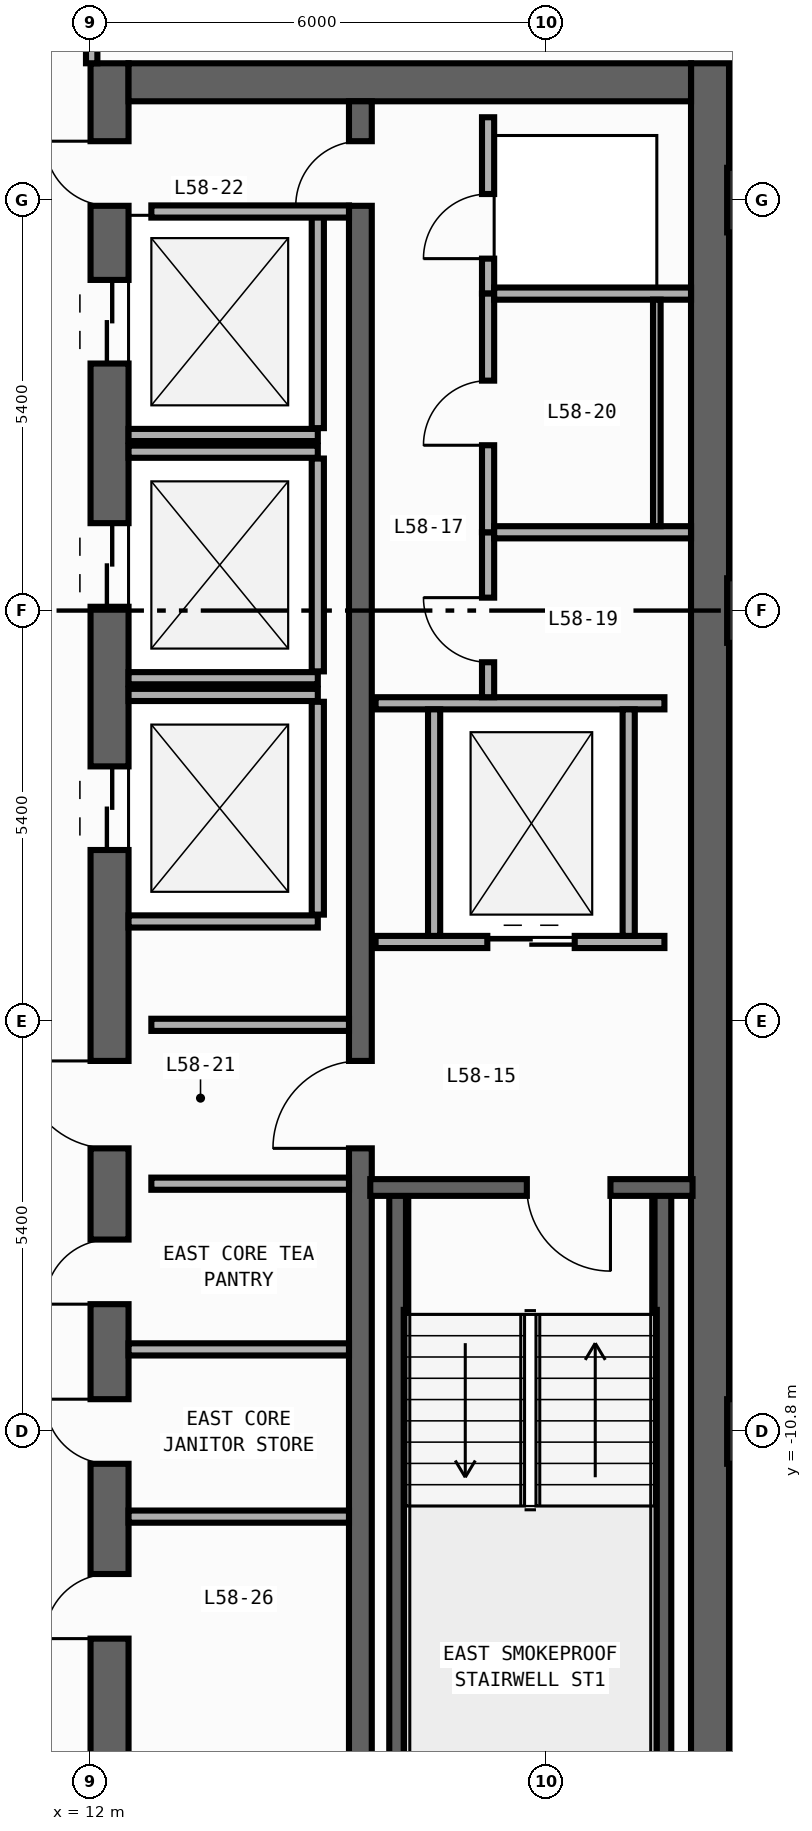
"""IFC4 building model, lengths in metres.
Left out: names, types, materials, properties, quantities, classifications, styles, units other than length and angle.
Written with IfcOpenShell. Run it as: python <this file> out.ifc"""

import sys

from ifc_helpers import new_model, si_unit, direction, frame, frame_2d, origin, origin_2d, place, context, subcontext, project, spatial, rectangle, extrude, element, fill, save


model = new_model("IFC4")
c1 = context("Model", 3, precision=1e-05, world=origin(), true_north=direction((0.0, 1.0)))
c2 = subcontext(c1, "Body", "Model", "MODEL_VIEW")
j1 = project(units=[si_unit("LENGTHUNIT", "METRE"), si_unit("PLANEANGLEUNIT", "RADIAN")], contexts=[c1])
p1 = place(None, origin())
s1 = spatial("IfcSite", under=j1, at=p1, CompositionType="ELEMENT")
p2 = place(p1, origin())
s2 = spatial("IfcBuilding", under=s1, at=p2, CompositionType="ELEMENT")
p3 = place(p2, frame((0.0, 0.0, 247.6)))
s3 = spatial("IfcBuildingStorey", under=s2, at=p3, CompositionType="ELEMENT", Elevation=247.6)
p4 = place(p3, frame((12.25, -19.8, 0.0), z_axis=(0.0, 0.0, 1.0), x_axis=(0.0, 1.0, 0.0)))
e1 = element("IfcWall", 1, at=p4, inside=s3, PredefinedType="SHEAR", context=c2, shape_type="SweptSolid", body=[
    extrude(rectangle(XDim=27.0, YDim=0.5, at=frame_2d((13.5, 0.0))), origin(), (0.0, 0.0, 1.0), 3.34),
])
p5 = place(p4, frame((23.05, 0.0, 0.0)))
e2 = element("IfcOpeningElement", 2, at=p5, cuts=e1, PredefinedType="OPENING", context=c2, shape_type="SweptSolid", body=[
    extrude(rectangle(XDim=1.1, YDim=2.2, at=frame_2d((0.55, 1.1))), frame((0.0, 0.26, 0.0), z_axis=(0.0, -1.0, 0.0), x_axis=(1.0, 0.0, 0.0)), (0.0, 0.0, 1.0), 0.52),
])
p6 = place(p4, frame((19.85, 0.0, 0.0)))
e3 = element("IfcOpeningElement", 3, at=p6, cuts=e1, PredefinedType="OPENING", context=c2, shape_type="SweptSolid", body=[
    extrude(rectangle(XDim=1.1, YDim=2.2, at=frame_2d((0.55, 1.1))), frame((0.0, 0.26, 0.0), z_axis=(0.0, -1.0, 0.0), x_axis=(1.0, 0.0, 0.0)), (0.0, 0.0, 1.0), 0.52),
])
p7 = place(p4, frame((16.65, 0.0, 0.0)))
e4 = element("IfcOpeningElement", 4, at=p7, cuts=e1, PredefinedType="OPENING", context=c2, shape_type="SweptSolid", body=[
    extrude(rectangle(XDim=1.1, YDim=2.2, at=frame_2d((0.55, 1.1))), frame((0.0, 0.26, 0.0), z_axis=(0.0, -1.0, 0.0), x_axis=(1.0, 0.0, 0.0)), (0.0, 0.0, 1.0), 0.52),
])
p8 = place(p4, frame((6.275, 0.0, 0.0)))
e5 = element("IfcOpeningElement", 5, at=p8, cuts=e1, PredefinedType="OPENING", context=c2, shape_type="SweptSolid", body=[
    extrude(rectangle(XDim=0.85, YDim=2.1, at=frame_2d((0.425, 1.05))), frame((0.0, 0.26, 0.0), z_axis=(0.0, -1.0, 0.0), x_axis=(1.0, 0.0, 0.0)), (0.0, 0.0, 1.0), 0.52),
])
p9 = place(p4, frame((8.575, 0.0, 0.0)))
e6 = element("IfcOpeningElement", 6, at=p9, cuts=e1, PredefinedType="OPENING", context=c2, shape_type="SweptSolid", body=[
    extrude(rectangle(XDim=0.85, YDim=2.1, at=frame_2d((0.425, 1.05))), frame((0.0, 0.26, 0.0), z_axis=(0.0, -1.0, 0.0), x_axis=(1.0, 0.0, 0.0)), (0.0, 0.0, 1.0), 0.52),
])
p10 = place(p4, frame((10.675, 0.0, 0.0)))
e7 = element("IfcOpeningElement", 7, at=p10, cuts=e1, PredefinedType="OPENING", context=c2, shape_type="SweptSolid", body=[
    extrude(rectangle(XDim=0.85, YDim=2.1, at=frame_2d((0.425, 1.05))), frame((0.0, 0.26, 0.0), z_axis=(0.0, -1.0, 0.0), x_axis=(1.0, 0.0, 0.0)), (0.0, 0.0, 1.0), 0.52),
])
p11 = place(p4, frame((12.725, 0.0, 0.0)))
e8 = element("IfcOpeningElement", 8, at=p11, cuts=e1, PredefinedType="OPENING", context=c2, shape_type="SweptSolid", body=[
    extrude(rectangle(XDim=1.15, YDim=2.2, at=frame_2d((0.575, 1.1))), frame((0.0, 0.26, 0.0), z_axis=(0.0, -1.0, 0.0), x_axis=(1.0, 0.0, 0.0)), (0.0, 0.0, 1.0), 0.52),
])
p12 = place(p4, frame((25.125, 0.0, 0.0)))
e9 = element("IfcOpeningElement", 9, at=p12, cuts=e1, PredefinedType="OPENING", context=c2, shape_type="SweptSolid", body=[
    extrude(rectangle(XDim=0.85, YDim=2.1, at=frame_2d((0.425, 1.05))), frame((0.0, 0.26, 0.0), z_axis=(0.0, -1.0, 0.0), x_axis=(1.0, 0.0, 0.0)), (0.0, 0.0, 1.0), 0.52),
])
p13 = place(p3, frame((20.15, -19.8, 0.0), z_axis=(0.0, 0.0, 1.0), x_axis=(0.0, 1.0, 0.0)))
e10 = element("IfcWall", 10, at=p13, inside=s3, PredefinedType="SHEAR", context=c2, shape_type="SweptSolid", body=[
    extrude(rectangle(XDim=27.0, YDim=0.5, at=frame_2d((13.5, 0.0))), origin(), (0.0, 0.0, 1.0), 3.34),
])
p14 = place(p3, frame((12.5, 6.95, 0.0), z_axis=(0.0, 0.0, 1.0), x_axis=(1.0, 0.0, 0.0)))
e11 = element("IfcWall", 11, at=p14, inside=s3, PredefinedType="SHEAR", context=c2, shape_type="SweptSolid", body=[
    extrude(rectangle(XDim=7.4, YDim=0.5, at=frame_2d((3.7, 0.0))), origin(), (0.0, 0.0, 1.0), 3.34),
])
p15 = place(p3, frame((15.55, -19.3, 0.0), z_axis=(0.0, 0.0, 1.0), x_axis=(0.0, 1.0, 0.0)))
e12 = element("IfcWall", 12, at=p15, inside=s3, PredefinedType="SHEAR", context=c2, shape_type="SweptSolid", body=[
    extrude(rectangle(XDim=26.0, YDim=0.3, at=frame_2d((13.0, 0.0))), origin(), (0.0, 0.0, 1.0), 3.34),
])
p16 = place(p15, frame((12.225, 0.0, 0.0)))
e13 = element("IfcOpeningElement", 13, at=p16, cuts=e12, PredefinedType="OPENING", context=c2, shape_type="SweptSolid", body=[
    extrude(rectangle(XDim=1.15, YDim=2.2, at=frame_2d((0.575, 1.1))), frame((0.0, 0.16, 0.0), z_axis=(0.0, -1.0, 0.0), x_axis=(1.0, 0.0, 0.0)), (0.0, 0.0, 1.0), 0.32),
])
p17 = place(p15, frame((24.625, 0.0, 0.0)))
e14 = element("IfcOpeningElement", 14, at=p17, cuts=e12, PredefinedType="OPENING", context=c2, shape_type="SweptSolid", body=[
    extrude(rectangle(XDim=0.85, YDim=2.1, at=frame_2d((0.425, 1.05))), frame((0.0, 0.16, 0.0), z_axis=(0.0, -1.0, 0.0), x_axis=(1.0, 0.0, 0.0)), (0.0, 0.0, 1.0), 0.32),
])
for number, where, z_axis, x_axis in (
    (15, (16.04, -19.01, 0.0), (0.0, 0.0, 1.0), (0.0, 1.0, 0.0)),
    (16, (19.53, -19.01, 0.0), (0.0, 0.0, 1.0), (0.0, 1.0, 0.0)),
):
    element("IfcWall", number, at=place(p3, frame(where, z_axis=z_axis, x_axis=x_axis)), inside=s3, PredefinedType="SHEAR", context=c2, shape_type="SweptSolid", body=[
        extrude(rectangle(XDim=11.42, YDim=0.22, at=frame_2d((5.71, 0.0))), origin(), (0.0, 0.0, 1.0), 3.34),
    ])
p18 = place(p3, frame((19.92, -7.59, 0.0), z_axis=(0.0, 0.0, 1.0), x_axis=(-1.0, 0.0, 0.0)))
e17 = element("IfcWall", 17, at=p18, inside=s3, PredefinedType="SHEAR", context=c2, shape_type="SweptSolid", body=[
    extrude(rectangle(XDim=4.24, YDim=0.22, at=frame_2d((2.12, 0.0))), origin(), (0.0, 0.0, 1.0), 3.34),
])
p19 = place(p18, frame((1.08, 0.0, 0.0)))
e18 = element("IfcOpeningElement", 18, at=p19, cuts=e17, PredefinedType="OPENING", context=c2, shape_type="SweptSolid", body=[
    extrude(rectangle(XDim=1.1, YDim=2.2, at=frame_2d((0.55, 1.1))), frame((0.0, 0.12, 0.0), z_axis=(0.0, -1.0, 0.0), x_axis=(1.0, 0.0, 0.0)), (0.0, 0.0, 1.0), 0.24),
])
for number, where, z_axis, x_axis in (
    (19, (20.8, -10.8, 0.0), (0.0, 0.0, 1.0), (1.0, 0.0, 0.0)),
    (20, (20.8, 0.0, 0.0), (0.0, 0.0, 1.0), (1.0, 0.0, 0.0)),
    (21, (20.8, 5.4, 0.0), (0.0, 0.0, 1.0), (1.0, 0.0, 0.0)),
):
    element("IfcColumn", number, at=place(p3, frame(where, z_axis=z_axis, x_axis=x_axis)), inside=s3, PredefinedType="COLUMN", context=c2, shape_type="SweptSolid", body=[
        extrude(rectangle(XDim=0.85, YDim=0.85, at=origin_2d()), origin(), (0.0, 0.0, 1.0), 3.6),
    ])
p20 = place(p3, frame((12.5, 2.31, 0.0), z_axis=(0.0, 0.0, 1.0), x_axis=(1.0, 0.0, 0.0)))
e22 = element("IfcWall", 22, at=p20, inside=s3, PredefinedType="STANDARD", context=c2, shape_type="SweptSolid", body=[
    extrude(rectangle(XDim=2.49, YDim=0.16, at=frame_2d((1.245, 0.0))), origin(), (0.0, 0.0, 1.0), 3.34),
])
p21 = place(p3, frame((14.99, 2.4, 0.0), z_axis=(0.0, 0.0, 1.0), x_axis=(0.0, 1.0, 0.0)))
e23 = element("IfcWall", 23, at=p21, inside=s3, PredefinedType="STANDARD", context=c2, shape_type="SweptSolid", body=[
    extrude(rectangle(XDim=2.8, YDim=0.16, at=frame_2d((1.4, 0.0))), origin(), (0.0, 0.0, 1.0), 3.34),
])
for number, where, z_axis, x_axis in (
    (24, (12.5, -0.89, 0.0), (0.0, 0.0, 1.0), (1.0, 0.0, 0.0)),
    (25, (12.5, 2.09, 0.0), (0.0, 0.0, 1.0), (1.0, 0.0, 0.0)),
):
    element("IfcWall", number, at=place(p3, frame(where, z_axis=z_axis, x_axis=x_axis)), inside=s3, PredefinedType="STANDARD", context=c2, shape_type="SweptSolid", body=[
        extrude(rectangle(XDim=2.49, YDim=0.16, at=frame_2d((1.245, 0.0))), origin(), (0.0, 0.0, 1.0), 3.34),
    ])
p22 = place(p3, frame((14.99, -0.8, 0.0), z_axis=(0.0, 0.0, 1.0), x_axis=(0.0, 1.0, 0.0)))
e26 = element("IfcWall", 26, at=p22, inside=s3, PredefinedType="STANDARD", context=c2, shape_type="SweptSolid", body=[
    extrude(rectangle(XDim=2.8, YDim=0.16, at=frame_2d((1.4, 0.0))), origin(), (0.0, 0.0, 1.0), 3.34),
])
for number, where, z_axis, x_axis in (
    (27, (12.5, -4.09, 0.0), (0.0, 0.0, 1.0), (1.0, 0.0, 0.0)),
    (28, (12.5, -1.11, 0.0), (0.0, 0.0, 1.0), (1.0, 0.0, 0.0)),
):
    element("IfcWall", number, at=place(p3, frame(where, z_axis=z_axis, x_axis=x_axis)), inside=s3, PredefinedType="STANDARD", context=c2, shape_type="SweptSolid", body=[
        extrude(rectangle(XDim=2.49, YDim=0.16, at=frame_2d((1.245, 0.0))), origin(), (0.0, 0.0, 1.0), 3.34),
    ])
p23 = place(p3, frame((14.99, -4.0, 0.0), z_axis=(0.0, 0.0, 1.0), x_axis=(0.0, 1.0, 0.0)))
e29 = element("IfcWall", 29, at=p23, inside=s3, PredefinedType="STANDARD", context=c2, shape_type="SweptSolid", body=[
    extrude(rectangle(XDim=2.8, YDim=0.16, at=frame_2d((1.4, 0.0))), origin(), (0.0, 0.0, 1.0), 3.34),
])
p24 = place(p3, frame((15.75, -4.36, 0.0), z_axis=(0.0, 0.0, 1.0), x_axis=(1.0, 0.0, 0.0)))
e30 = element("IfcWall", 30, at=p24, inside=s3, PredefinedType="STANDARD", context=c2, shape_type="SweptSolid", body=[
    extrude(rectangle(XDim=3.8, YDim=0.16, at=frame_2d((1.9, 0.0))), origin(), (0.0, 0.0, 1.0), 3.34),
])
p25 = place(p24, frame((1.47, 0.0, 0.0)))
e31 = element("IfcOpeningElement", 31, at=p25, cuts=e30, PredefinedType="OPENING", context=c2, shape_type="SweptSolid", body=[
    extrude(rectangle(XDim=1.15, YDim=2.2, at=frame_2d((0.575, 1.1))), frame((0.0, 0.09, 0.0), z_axis=(0.0, -1.0, 0.0), x_axis=(1.0, 0.0, 0.0)), (0.0, 0.0, 1.0), 0.18),
])
p26 = place(p3, frame((15.75, -1.22, 0.0), z_axis=(0.0, 0.0, 1.0), x_axis=(1.0, 0.0, 0.0)))
e32 = element("IfcWall", 32, at=p26, inside=s3, PredefinedType="STANDARD", context=c2, shape_type="SweptSolid", body=[
    extrude(rectangle(XDim=3.8, YDim=0.16, at=frame_2d((1.9, 0.0))), origin(), (0.0, 0.0, 1.0), 3.34),
])
for number, where, z_axis, x_axis in (
    (33, (16.52, -4.28, 0.0), (0.0, 0.0, 1.0), (0.0, 1.0, 0.0)),
    (34, (19.08, -4.28, 0.0), (0.0, 0.0, 1.0), (0.0, 1.0, 0.0)),
):
    element("IfcWall", number, at=place(p3, frame(where, z_axis=z_axis, x_axis=x_axis)), inside=s3, PredefinedType="STANDARD", context=c2, shape_type="SweptSolid", body=[
        extrude(rectangle(XDim=2.98, YDim=0.16, at=frame_2d((1.49, 0.0))), origin(), (0.0, 0.0, 1.0), 3.34),
    ])
for number, where, z_axis, x_axis in (
    (35, (12.8, -5.45, 0.0), (0.0, 0.0, 1.0), (1.0, 0.0, 0.0)),
    (36, (12.8, -7.54, 0.0), (0.0, 0.0, 1.0), (1.0, 0.0, 0.0)),
    (37, (12.8, 5.25, 0.0), (0.0, 0.0, 1.0), (1.0, 0.0, 0.0)),
):
    element("IfcWall", number, at=place(p3, frame(where, z_axis=z_axis, x_axis=x_axis)), inside=s3, PredefinedType="STANDARD", context=c2, shape_type="SweptSolid", body=[
        extrude(rectangle(XDim=2.6, YDim=0.16, at=frame_2d((1.3, 0.0))), origin(), (0.0, 0.0, 1.0), 3.34),
    ])
p27 = place(p3, frame((17.23, 4.17, 0.0), z_axis=(0.0, 0.0, 1.0), x_axis=(0.0, 1.0, 0.0)))
e38 = element("IfcWall", 38, at=p27, inside=s3, PredefinedType="PARTITIONING", context=c2, shape_type="SweptSolid", body=[
    extrude(rectangle(XDim=2.32, YDim=0.16, at=frame_2d((1.16, 0.0))), origin(), (0.0, 0.0, 1.0), 3.34),
])
p28 = place(p27, frame((0.46, 0.0, 0.0)))
e39 = element("IfcOpeningElement", 39, at=p28, cuts=e38, PredefinedType="OPENING", context=c2, shape_type="SweptSolid", body=[
    extrude(rectangle(XDim=0.85, YDim=2.1, at=frame_2d((0.425, 1.05))), frame((0.0, 0.09, 0.0), z_axis=(0.0, -1.0, 0.0), x_axis=(1.0, 0.0, 0.0)), (0.0, 0.0, 1.0), 0.18),
])
p29 = place(p3, frame((17.23, -1.14, 0.0), z_axis=(0.0, 0.0, 1.0), x_axis=(0.0, 1.0, 0.0)))
e40 = element("IfcWall", 40, at=p29, inside=s3, PredefinedType="PARTITIONING", context=c2, shape_type="SweptSolid", body=[
    extrude(rectangle(XDim=2.17, YDim=0.16, at=frame_2d((1.085, 0.0))), origin(), (0.0, 0.0, 1.0), 3.34),
])
p30 = place(p29, frame((0.46, 0.0, 0.0)))
e41 = element("IfcOpeningElement", 41, at=p30, cuts=e40, PredefinedType="OPENING", context=c2, shape_type="SweptSolid", body=[
    extrude(rectangle(XDim=0.85, YDim=2.1, at=frame_2d((0.425, 1.05))), frame((0.0, 0.09, 0.0), z_axis=(0.0, -1.0, 0.0), x_axis=(1.0, 0.0, 0.0)), (0.0, 0.0, 1.0), 0.18),
])
p31 = place(p3, frame((17.23, 1.03, 0.0), z_axis=(0.0, 0.0, 1.0), x_axis=(0.0, 1.0, 0.0)))
e42 = element("IfcWall", 42, at=p31, inside=s3, PredefinedType="PARTITIONING", context=c2, shape_type="SweptSolid", body=[
    extrude(rectangle(XDim=3.14, YDim=0.16, at=frame_2d((1.57, 0.0))), origin(), (0.0, 0.0, 1.0), 3.34),
])
p32 = place(p31, frame((1.145, 0.0, 0.0)))
e43 = element("IfcOpeningElement", 43, at=p32, cuts=e42, PredefinedType="OPENING", context=c2, shape_type="SweptSolid", body=[
    extrude(rectangle(XDim=0.85, YDim=2.1, at=frame_2d((0.425, 1.05))), frame((0.0, 0.09, 0.0), z_axis=(0.0, -1.0, 0.0), x_axis=(1.0, 0.0, 0.0)), (0.0, 0.0, 1.0), 0.18),
])
for number, where, z_axis, x_axis in (
    (44, (17.31, 4.17, 0.0), (0.0, 0.0, 1.0), (1.0, 0.0, 0.0)),
    (45, (17.31, 1.03, 0.0), (0.0, 0.0, 1.0), (1.0, 0.0, 0.0)),
):
    element("IfcWall", number, at=place(p3, frame(where, z_axis=z_axis, x_axis=x_axis)), inside=s3, PredefinedType="PARTITIONING", context=c2, shape_type="SweptSolid", body=[
        extrude(rectangle(XDim=2.59, YDim=0.16, at=frame_2d((1.295, 0.0))), origin(), (0.0, 0.0, 1.0), 3.34),
    ])
for number, where, z_axis, x_axis in (
    (46, (12.5, -11.92, 0.0), (0.0, 0.0, 1.0), (1.0, 0.0, 0.0)),
    (47, (12.5, -9.72, 0.0), (0.0, 0.0, 1.0), (1.0, 0.0, 0.0)),
):
    element("IfcWall", number, at=place(p3, frame(where, z_axis=z_axis, x_axis=x_axis)), inside=s3, PredefinedType="PARTITIONING", context=c2, shape_type="SweptSolid", body=[
        extrude(rectangle(XDim=2.9, YDim=0.16, at=frame_2d((1.45, 0.0))), origin(), (0.0, 0.0, 1.0), 3.34),
    ])
p33 = place(p3, frame((12.015, 7.2, 0.0), z_axis=(0.0, 0.0, 1.0), x_axis=(0.0, 1.0, 0.0)))
e48 = element("IfcWall", 48, at=p33, inside=s3, PredefinedType="PARTITIONING", context=c2, shape_type="SweptSolid", body=[
    extrude(rectangle(XDim=6.52, YDim=0.15, at=frame_2d((3.26, 0.0))), origin(), (0.0, 0.0, 1.0), 3.34),
])
p34 = place(p33, frame((0.67, 0.0, 0.0)))
e49 = element("IfcOpeningElement", 49, at=p34, cuts=e48, PredefinedType="OPENING", context=c2, shape_type="SweptSolid", body=[
    extrude(rectangle(XDim=0.9, YDim=2.15, at=frame_2d((0.45, 1.075))), frame((0.0, 0.085, 0.0), z_axis=(0.0, -1.0, 0.0), x_axis=(1.0, 0.0, 0.0)), (0.0, 0.0, 1.0), 0.17),
])
p35 = place(p3, frame((19.45, 4.09, 0.0), z_axis=(0.0, 0.0, 1.0), x_axis=(0.0, -1.0, 0.0)))
e50 = element("IfcWall", 50, at=p35, inside=s3, PredefinedType="PARTITIONING", context=c2, shape_type="SweptSolid", body=[
    extrude(rectangle(XDim=2.98, YDim=0.1, at=frame_2d((1.49, 0.0))), origin(), (0.0, 0.0, 1.0), 3.34),
])
p36 = place(p19, origin())
e51 = element("IfcDoor", 51, at=p36, inside=s3, OperationType="SINGLE_SWING_LEFT", PredefinedType="DOOR", context=c2, shape_type="SweptSolid", body=[
    extrude(rectangle(XDim=1.1, YDim=2.2, at=frame_2d((0.55, 1.1))), frame((0.0, 0.025, 0.0), z_axis=(0.0, -1.0, 0.0), x_axis=(1.0, 0.0, 0.0)), (0.0, 0.0, 1.0), 0.05),
])
fill(e18, e51)
p37 = place(p5, origin())
e52 = element("IfcDoor", 52, at=p37, inside=s3, OperationType="DOUBLE_DOOR_SLIDING", PredefinedType="DOOR", context=c2, shape_type="SweptSolid", body=[
    extrude(rectangle(XDim=1.1, YDim=2.2, at=frame_2d((0.55, 1.1))), frame((0.0, 0.025, 0.0), z_axis=(0.0, -1.0, 0.0), x_axis=(1.0, 0.0, 0.0)), (0.0, 0.0, 1.0), 0.05),
])
fill(e2, e52)
p38 = place(p6, origin())
e53 = element("IfcDoor", 53, at=p38, inside=s3, OperationType="DOUBLE_DOOR_SLIDING", PredefinedType="DOOR", context=c2, shape_type="SweptSolid", body=[
    extrude(rectangle(XDim=1.1, YDim=2.2, at=frame_2d((0.55, 1.1))), frame((0.0, 0.025, 0.0), z_axis=(0.0, -1.0, 0.0), x_axis=(1.0, 0.0, 0.0)), (0.0, 0.0, 1.0), 0.05),
])
fill(e3, e53)
p39 = place(p7, origin())
e54 = element("IfcDoor", 54, at=p39, inside=s3, OperationType="DOUBLE_DOOR_SLIDING", PredefinedType="DOOR", context=c2, shape_type="SweptSolid", body=[
    extrude(rectangle(XDim=1.1, YDim=2.2, at=frame_2d((0.55, 1.1))), frame((0.0, 0.025, 0.0), z_axis=(0.0, -1.0, 0.0), x_axis=(1.0, 0.0, 0.0)), (0.0, 0.0, 1.0), 0.05),
])
fill(e4, e54)
p40 = place(p8, origin())
e55 = element("IfcDoor", 55, at=p40, inside=s3, OperationType="SINGLE_SWING_LEFT", PredefinedType="DOOR", context=c2, shape_type="SweptSolid", body=[
    extrude(rectangle(XDim=0.85, YDim=2.1, at=frame_2d((0.425, 1.05))), frame((0.0, 0.025, 0.0), z_axis=(0.0, -1.0, 0.0), x_axis=(1.0, 0.0, 0.0)), (0.0, 0.0, 1.0), 0.05),
])
fill(e5, e55)
p41 = place(p9, origin())
e56 = element("IfcDoor", 56, at=p41, inside=s3, OperationType="SINGLE_SWING_RIGHT", PredefinedType="DOOR", context=c2, shape_type="SweptSolid", body=[
    extrude(rectangle(XDim=0.85, YDim=2.1, at=frame_2d((0.425, 1.05))), frame((0.0, 0.025, 0.0), z_axis=(0.0, -1.0, 0.0), x_axis=(1.0, 0.0, 0.0)), (0.0, 0.0, 1.0), 0.05),
])
fill(e6, e56)
p42 = place(p10, origin())
e57 = element("IfcDoor", 57, at=p42, inside=s3, OperationType="SINGLE_SWING_LEFT", PredefinedType="DOOR", context=c2, shape_type="SweptSolid", body=[
    extrude(rectangle(XDim=0.85, YDim=2.1, at=frame_2d((0.425, 1.05))), frame((0.0, 0.025, 0.0), z_axis=(0.0, -1.0, 0.0), x_axis=(1.0, 0.0, 0.0)), (0.0, 0.0, 1.0), 0.05),
])
fill(e7, e57)
p43 = place(p11, origin())
e58 = element("IfcDoor", 58, at=p43, inside=s3, OperationType="SINGLE_SWING_RIGHT", PredefinedType="DOOR", context=c2, shape_type="SweptSolid", body=[
    extrude(rectangle(XDim=1.15, YDim=2.2, at=frame_2d((0.575, 1.1))), frame((0.0, 0.025, 0.0), z_axis=(0.0, -1.0, 0.0), x_axis=(1.0, 0.0, 0.0)), (0.0, 0.0, 1.0), 0.05),
])
fill(e8, e58)
p44 = place(p16, origin())
e59 = element("IfcDoor", 59, at=p44, inside=s3, OperationType="SINGLE_SWING_LEFT", PredefinedType="DOOR", context=c2, shape_type="SweptSolid", body=[
    extrude(rectangle(XDim=1.15, YDim=2.2, at=frame_2d((0.575, 1.1))), frame((0.0, 0.025, 0.0), z_axis=(0.0, -1.0, 0.0), x_axis=(1.0, 0.0, 0.0)), (0.0, 0.0, 1.0), 0.05),
])
fill(e13, e59)
p45 = place(p12, origin())
e60 = element("IfcDoor", 60, at=p45, inside=s3, OperationType="SINGLE_SWING_RIGHT", PredefinedType="DOOR", context=c2, shape_type="SweptSolid", body=[
    extrude(rectangle(XDim=0.85, YDim=2.1, at=frame_2d((0.425, 1.05))), frame((0.0, 0.025, 0.0), z_axis=(0.0, -1.0, 0.0), x_axis=(1.0, 0.0, 0.0)), (0.0, 0.0, 1.0), 0.05),
])
fill(e9, e60)
p46 = place(p17, origin())
e61 = element("IfcDoor", 61, at=p46, inside=s3, OperationType="SINGLE_SWING_LEFT", PredefinedType="DOOR", context=c2, shape_type="SweptSolid", body=[
    extrude(rectangle(XDim=0.85, YDim=2.1, at=frame_2d((0.425, 1.05))), frame((0.0, 0.025, 0.0), z_axis=(0.0, -1.0, 0.0), x_axis=(1.0, 0.0, 0.0)), (0.0, 0.0, 1.0), 0.05),
])
fill(e14, e61)
p47 = place(p25, origin())
e62 = element("IfcDoor", 62, at=p47, inside=s3, OperationType="DOUBLE_DOOR_SLIDING", PredefinedType="DOOR", context=c2, shape_type="SweptSolid", body=[
    extrude(rectangle(XDim=1.15, YDim=2.2, at=frame_2d((0.575, 1.1))), frame((0.0, 0.025, 0.0), z_axis=(0.0, -1.0, 0.0), x_axis=(1.0, 0.0, 0.0)), (0.0, 0.0, 1.0), 0.05),
])
fill(e31, e62)
p48 = place(p28, origin())
e63 = element("IfcDoor", 63, at=p48, inside=s3, OperationType="SINGLE_SWING_LEFT", PredefinedType="DOOR", context=c2, shape_type="SweptSolid", body=[
    extrude(rectangle(XDim=0.85, YDim=2.1, at=frame_2d((0.425, 1.05))), frame((0.0, 0.025, 0.0), z_axis=(0.0, -1.0, 0.0), x_axis=(1.0, 0.0, 0.0)), (0.0, 0.0, 1.0), 0.05),
])
fill(e39, e63)
p49 = place(p30, origin())
e64 = element("IfcDoor", 64, at=p49, inside=s3, OperationType="SINGLE_SWING_RIGHT", PredefinedType="DOOR", context=c2, shape_type="SweptSolid", body=[
    extrude(rectangle(XDim=0.85, YDim=2.1, at=frame_2d((0.425, 1.05))), frame((0.0, 0.025, 0.0), z_axis=(0.0, -1.0, 0.0), x_axis=(1.0, 0.0, 0.0)), (0.0, 0.0, 1.0), 0.05),
])
fill(e41, e64)
p50 = place(p32, origin())
e65 = element("IfcDoor", 65, at=p50, inside=s3, OperationType="SINGLE_SWING_LEFT", PredefinedType="DOOR", context=c2, shape_type="SweptSolid", body=[
    extrude(rectangle(XDim=0.85, YDim=2.1, at=frame_2d((0.425, 1.05))), frame((0.0, 0.025, 0.0), z_axis=(0.0, -1.0, 0.0), x_axis=(1.0, 0.0, 0.0)), (0.0, 0.0, 1.0), 0.05),
])
fill(e43, e65)
save(model, sys.argv[1])
